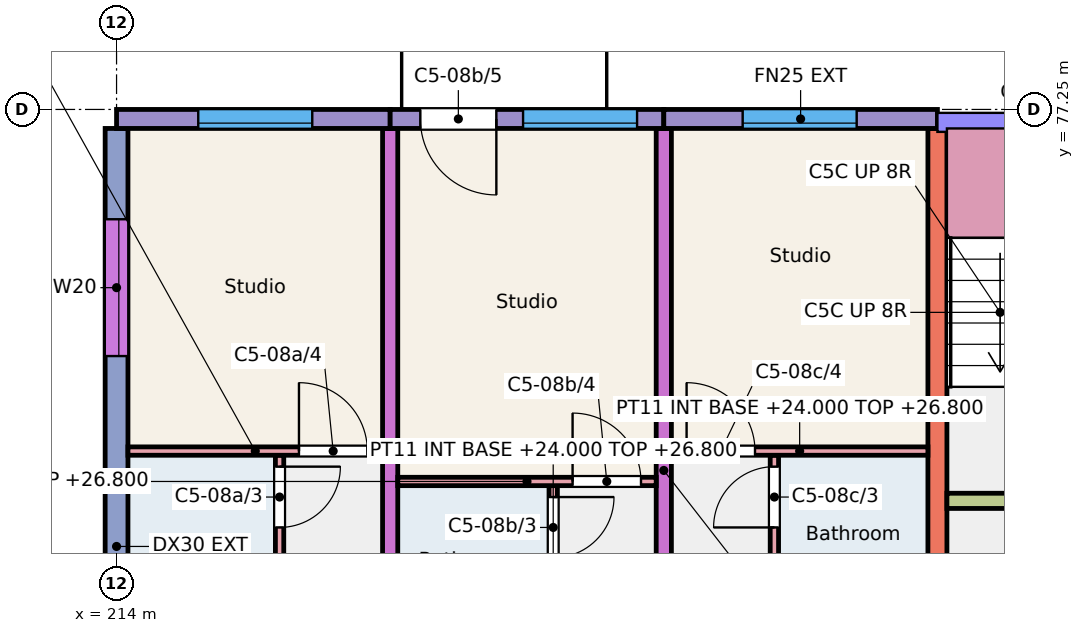
"""IFC4 building model, lengths in metres.
Left out: names, types, materials, properties, quantities, classifications, styles, units other than length and angle.
Written with IfcOpenShell. Run it as: python <this file> out.ifc"""

import sys

from ifc_helpers import new_model, si_unit, direction, frame, frame_2d, origin, place, context, subcontext, project, spatial, rectangle, extrude, element, fill, save


model = new_model("IFC4")
c1 = context("Model", 3, precision=1e-05, world=origin(), true_north=direction((0.0, 1.0)))
c2 = subcontext(c1, "Body", "Model", "MODEL_VIEW")
j1 = project(units=[si_unit("LENGTHUNIT", "METRE"), si_unit("PLANEANGLEUNIT", "RADIAN")], contexts=[c1])
p1 = place(None, origin())
s1 = spatial("IfcSite", under=j1, at=p1, CompositionType="ELEMENT")
p2 = place(p1, origin())
s2 = spatial("IfcBuilding", under=s1, at=p2, CompositionType="ELEMENT")
p3 = place(p2, frame((0.0, 0.0, 24.0)))
s3 = spatial("IfcBuildingStorey", under=s2, at=p3, CompositionType="ELEMENT", Elevation=24.0)
p4 = place(p3, frame((214.0, 66.0, 0.0), z_axis=(0.0, 0.0, 1.0), x_axis=(0.0, 1.0, 0.0)))
e1 = element("IfcWall", 1, at=p4, inside=s3, PredefinedType="SHEAR", context=c2, shape_type="SweptSolid", body=[
    extrude(rectangle(XDim=11.0, YDim=0.3, at=frame_2d((5.5, 0.0))), origin(), (0.0, 0.0, 1.0), 3.0),
])
p5 = place(p4, frame((2.6, 0.0, 0.9)))
e2 = element("IfcOpeningElement", 2, at=p5, cuts=e1, PredefinedType="OPENING", context=c2, shape_type="SweptSolid", body=[
    extrude(rectangle(XDim=1.2, YDim=1.5, at=frame_2d((0.6, 0.75))), frame((0.0, 0.16, 0.0), z_axis=(0.0, -1.0, 0.0), x_axis=(1.0, 0.0, 0.0)), (0.0, 0.0, 1.0), 0.32),
])
p6 = place(p4, frame((8.005, 0.0, 0.9)))
e3 = element("IfcOpeningElement", 3, at=p6, cuts=e1, PredefinedType="OPENING", context=c2, shape_type="SweptSolid", body=[
    extrude(rectangle(XDim=1.8, YDim=1.5, at=frame_2d((0.9, 0.75))), frame((0.0, 0.16, 0.0), z_axis=(0.0, -1.0, 0.0), x_axis=(1.0, 0.0, 0.0)), (0.0, 0.0, 1.0), 0.32),
])
for number, where, z_axis, x_axis in (
    (4, (217.6, 68.0, 0.0), (0.0, 0.0, 1.0), (0.0, 1.0, 0.0)),
    (5, (221.2, 68.0, 0.0), (0.0, 0.0, 1.0), (0.0, 1.0, 0.0)),
):
    element("IfcWall", number, at=place(p3, frame(where, z_axis=z_axis, x_axis=x_axis)), inside=s3, PredefinedType="SHEAR", context=c2, shape_type="SweptSolid", body=[
        extrude(rectangle(XDim=9.0, YDim=0.2, at=frame_2d((4.5, 0.0))), origin(), (0.0, 0.0, 1.0), 3.0),
    ])
p7 = place(p3, frame((224.8, 68.0, 0.0), z_axis=(0.0, 0.0, 1.0), x_axis=(0.0, 1.0, 0.0)))
e6 = element("IfcWall", 6, at=p7, inside=s3, PredefinedType="SHEAR", context=c2, shape_type="SweptSolid", body=[
    extrude(rectangle(XDim=9.0, YDim=0.25, at=frame_2d((4.5, 0.0))), origin(), (0.0, 0.0, 1.0), 3.0),
])
p8 = place(p3, frame((214.0, 77.125, 0.0), z_axis=(0.0, 0.0, 1.0), x_axis=(1.0, 0.0, 0.0)))
e7 = element("IfcWall", 7, at=p8, inside=s3, PredefinedType="SOLIDWALL", context=c2, shape_type="SweptSolid", body=[
    extrude(rectangle(XDim=3.6, YDim=0.25, at=frame_2d((1.8, 0.0))), origin(), (0.0, 0.0, 1.0), 3.0),
])
p9 = place(p8, frame((1.075, 0.0, 0.9)))
e8 = element("IfcOpeningElement", 8, at=p9, cuts=e7, PredefinedType="OPENING", context=c2, shape_type="SweptSolid", body=[
    extrude(rectangle(XDim=1.5, YDim=1.5, at=frame_2d((0.75, 0.75))), frame((0.0, 0.135, 0.0), z_axis=(0.0, -1.0, 0.0), x_axis=(1.0, 0.0, 0.0)), (0.0, 0.0, 1.0), 0.27),
])
p10 = place(p3, frame((217.6, 77.125, 0.0), z_axis=(0.0, 0.0, 1.0), x_axis=(1.0, 0.0, 0.0)))
e9 = element("IfcWall", 9, at=p10, inside=s3, PredefinedType="SOLIDWALL", context=c2, shape_type="SweptSolid", body=[
    extrude(rectangle(XDim=3.6, YDim=0.25, at=frame_2d((1.8, 0.0))), origin(), (0.0, 0.0, 1.0), 3.0),
])
p11 = place(p10, frame((1.749, 0.0, 0.9)))
e10 = element("IfcOpeningElement", 10, at=p11, cuts=e9, PredefinedType="OPENING", context=c2, shape_type="SweptSolid", body=[
    extrude(rectangle(XDim=1.5, YDim=1.5, at=frame_2d((0.75, 0.75))), frame((0.0, 0.135, 0.0), z_axis=(0.0, -1.0, 0.0), x_axis=(1.0, 0.0, 0.0)), (0.0, 0.0, 1.0), 0.27),
])
p12 = place(p10, frame((0.397, 0.0, 0.0)))
e11 = element("IfcOpeningElement", 11, at=p12, cuts=e9, PredefinedType="OPENING", context=c2, shape_type="SweptSolid", body=[
    extrude(rectangle(XDim=1.0, YDim=2.1, at=frame_2d((0.5, 1.05))), frame((0.0, 0.135, 0.0), z_axis=(0.0, -1.0, 0.0), x_axis=(1.0, 0.0, 0.0)), (0.0, 0.0, 1.0), 0.27),
])
p13 = place(p3, frame((221.2, 77.125, 0.0), z_axis=(0.0, 0.0, 1.0), x_axis=(1.0, 0.0, 0.0)))
e12 = element("IfcWall", 12, at=p13, inside=s3, PredefinedType="SOLIDWALL", context=c2, shape_type="SweptSolid", body=[
    extrude(rectangle(XDim=3.6, YDim=0.25, at=frame_2d((1.8, 0.0))), origin(), (0.0, 0.0, 1.0), 3.0),
])
p14 = place(p13, frame((1.038, 0.0, 0.9)))
e13 = element("IfcOpeningElement", 13, at=p14, cuts=e12, PredefinedType="OPENING", context=c2, shape_type="SweptSolid", body=[
    extrude(rectangle(XDim=1.5, YDim=1.5, at=frame_2d((0.75, 0.75))), frame((0.0, 0.135, 0.0), z_axis=(0.0, -1.0, 0.0), x_axis=(1.0, 0.0, 0.0)), (0.0, 0.0, 1.0), 0.27),
])
p15 = place(p3, frame((224.925, 72.1, 0.0), z_axis=(0.0, 0.0, 1.0), x_axis=(1.0, 0.0, 0.0)))
e14 = element("IfcWall", 14, at=p15, inside=s3, PredefinedType="SHEAR", context=c2, shape_type="SweptSolid", body=[
    extrude(rectangle(XDim=5.725, YDim=0.2, at=frame_2d((2.862, 0.0))), origin(), (0.0, 0.0, 1.0), 3.0),
])
p16 = place(p15, frame((0.95, 0.0, 0.0)))
e15 = element("IfcOpeningElement", 15, at=p16, cuts=e14, PredefinedType="OPENING", context=c2, shape_type="SweptSolid", body=[
    extrude(rectangle(XDim=1.0, YDim=2.1, at=frame_2d((0.5, 1.05))), frame((0.0, 0.11, 0.0), z_axis=(0.0, -1.0, 0.0), x_axis=(1.0, 0.0, 0.0)), (0.0, 0.0, 1.0), 0.22),
])
p17 = place(p15, frame((3.863, 0.0, 0.0)))
e16 = element("IfcOpeningElement", 16, at=p17, cuts=e14, PredefinedType="OPENING", context=c2, shape_type="SweptSolid", body=[
    extrude(rectangle(XDim=1.1, YDim=2.1, at=frame_2d((0.55, 1.05))), frame((0.0, 0.11, 0.0), z_axis=(0.0, -1.0, 0.0), x_axis=(1.0, 0.0, 0.0)), (0.0, 0.0, 1.0), 0.22),
])
p18 = place(p3, frame((216.145, 68.0, 0.0), z_axis=(0.0, 0.0, 1.0), x_axis=(0.0, 1.0, 0.0)))
e17 = element("IfcWall", 17, at=p18, inside=s3, PredefinedType="PARTITIONING", context=c2, shape_type="SweptSolid", body=[
    extrude(rectangle(XDim=4.7, YDim=0.11, at=frame_2d((2.35, 0.0))), origin(), (0.0, 0.0, 1.0), 2.8),
])
p19 = place(p18, frame((0.2, 0.0, 0.0)))
e18 = element("IfcOpeningElement", 18, at=p19, cuts=e17, PredefinedType="OPENING", context=c2, shape_type="SweptSolid", body=[
    extrude(rectangle(XDim=0.8, YDim=2.1, at=frame_2d((0.4, 1.05))), frame((0.0, 0.065, 0.0), z_axis=(0.0, -1.0, 0.0), x_axis=(1.0, 0.0, 0.0)), (0.0, 0.0, 1.0), 0.13),
])
p20 = place(p18, frame((3.75, 0.0, 0.0)))
e19 = element("IfcOpeningElement", 19, at=p20, cuts=e17, PredefinedType="OPENING", context=c2, shape_type="SweptSolid", body=[
    extrude(rectangle(XDim=0.8, YDim=2.1, at=frame_2d((0.4, 1.05))), frame((0.0, 0.065, 0.0), z_axis=(0.0, -1.0, 0.0), x_axis=(1.0, 0.0, 0.0)), (0.0, 0.0, 1.0), 0.13),
])
p21 = place(p3, frame((214.15, 72.755, 0.0), z_axis=(0.0, 0.0, 1.0), x_axis=(1.0, 0.0, 0.0)))
e20 = element("IfcWall", 20, at=p21, inside=s3, PredefinedType="PARTITIONING", context=c2, shape_type="SweptSolid", body=[
    extrude(rectangle(XDim=3.35, YDim=0.11, at=frame_2d((1.675, 0.0))), origin(), (0.0, 0.0, 1.0), 2.8),
])
p22 = place(p21, frame((2.25, 0.0, 0.0)))
e21 = element("IfcOpeningElement", 21, at=p22, cuts=e20, PredefinedType="OPENING", context=c2, shape_type="SweptSolid", body=[
    extrude(rectangle(XDim=0.9, YDim=2.1, at=frame_2d((0.45, 1.05))), frame((0.0, 0.065, 0.0), z_axis=(0.0, -1.0, 0.0), x_axis=(1.0, 0.0, 0.0)), (0.0, 0.0, 1.0), 0.13),
])
p23 = place(p3, frame((219.745, 68.0, 0.0), z_axis=(0.0, 0.0, 1.0), x_axis=(0.0, 1.0, 0.0)))
e22 = element("IfcWall", 22, at=p23, inside=s3, PredefinedType="PARTITIONING", context=c2, shape_type="SweptSolid", body=[
    extrude(rectangle(XDim=4.3, YDim=0.11, at=frame_2d((2.15, 0.0))), origin(), (0.0, 0.0, 1.0), 2.8),
])
p24 = place(p23, frame((0.2, 0.0, 0.0)))
e23 = element("IfcOpeningElement", 23, at=p24, cuts=e22, PredefinedType="OPENING", context=c2, shape_type="SweptSolid", body=[
    extrude(rectangle(XDim=0.8, YDim=2.1, at=frame_2d((0.4, 1.05))), frame((0.0, 0.065, 0.0), z_axis=(0.0, -1.0, 0.0), x_axis=(1.0, 0.0, 0.0)), (0.0, 0.0, 1.0), 0.13),
])
p25 = place(p23, frame((3.35, 0.0, 0.0)))
e24 = element("IfcOpeningElement", 24, at=p25, cuts=e22, PredefinedType="OPENING", context=c2, shape_type="SweptSolid", body=[
    extrude(rectangle(XDim=0.8, YDim=2.1, at=frame_2d((0.4, 1.05))), frame((0.0, 0.065, 0.0), z_axis=(0.0, -1.0, 0.0), x_axis=(1.0, 0.0, 0.0)), (0.0, 0.0, 1.0), 0.13),
])
p26 = place(p3, frame((217.7, 72.355, 0.0), z_axis=(0.0, 0.0, 1.0), x_axis=(1.0, 0.0, 0.0)))
e25 = element("IfcWall", 25, at=p26, inside=s3, PredefinedType="PARTITIONING", context=c2, shape_type="SweptSolid", body=[
    extrude(rectangle(XDim=3.4, YDim=0.11, at=frame_2d((1.7, 0.0))), origin(), (0.0, 0.0, 1.0), 2.8),
])
p27 = place(p26, frame((2.3, 0.0, 0.0)))
e26 = element("IfcOpeningElement", 26, at=p27, cuts=e25, PredefinedType="OPENING", context=c2, shape_type="SweptSolid", body=[
    extrude(rectangle(XDim=0.9, YDim=2.1, at=frame_2d((0.45, 1.05))), frame((0.0, 0.065, 0.0), z_axis=(0.0, -1.0, 0.0), x_axis=(1.0, 0.0, 0.0)), (0.0, 0.0, 1.0), 0.13),
])
p28 = place(p3, frame((222.655, 68.0, 0.0), z_axis=(0.0, 0.0, 1.0), x_axis=(0.0, 1.0, 0.0)))
e27 = element("IfcWall", 27, at=p28, inside=s3, PredefinedType="PARTITIONING", context=c2, shape_type="SweptSolid", body=[
    extrude(rectangle(XDim=4.7, YDim=0.11, at=frame_2d((2.35, 0.0))), origin(), (0.0, 0.0, 1.0), 2.8),
])
p29 = place(p28, frame((0.2, 0.0, 0.0)))
e28 = element("IfcOpeningElement", 28, at=p29, cuts=e27, PredefinedType="OPENING", context=c2, shape_type="SweptSolid", body=[
    extrude(rectangle(XDim=0.8, YDim=2.1, at=frame_2d((0.4, 1.05))), frame((0.0, 0.065, 0.0), z_axis=(0.0, -1.0, 0.0), x_axis=(1.0, 0.0, 0.0)), (0.0, 0.0, 1.0), 0.13),
])
p30 = place(p28, frame((3.75, 0.0, 0.0)))
e29 = element("IfcOpeningElement", 29, at=p30, cuts=e27, PredefinedType="OPENING", context=c2, shape_type="SweptSolid", body=[
    extrude(rectangle(XDim=0.8, YDim=2.1, at=frame_2d((0.4, 1.05))), frame((0.0, 0.065, 0.0), z_axis=(0.0, -1.0, 0.0), x_axis=(1.0, 0.0, 0.0)), (0.0, 0.0, 1.0), 0.13),
])
p31 = place(p3, frame((221.3, 72.755, 0.0), z_axis=(0.0, 0.0, 1.0), x_axis=(1.0, 0.0, 0.0)))
e30 = element("IfcWall", 30, at=p31, inside=s3, PredefinedType="PARTITIONING", context=c2, shape_type="SweptSolid", body=[
    extrude(rectangle(XDim=3.375, YDim=0.11, at=frame_2d((1.688, 0.0))), origin(), (0.0, 0.0, 1.0), 2.8),
])
p32 = place(p31, frame((0.2, 0.0, 0.0)))
e31 = element("IfcOpeningElement", 31, at=p32, cuts=e30, PredefinedType="OPENING", context=c2, shape_type="SweptSolid", body=[
    extrude(rectangle(XDim=0.9, YDim=2.1, at=frame_2d((0.45, 1.05))), frame((0.0, 0.065, 0.0), z_axis=(0.0, -1.0, 0.0), x_axis=(1.0, 0.0, 0.0)), (0.0, 0.0, 1.0), 0.13),
])
p33 = place(p9, origin())
e32 = element("IfcWindow", 32, at=p33, inside=s3, PartitioningType="SINGLE_PANEL", PredefinedType="WINDOW", context=c2, shape_type="SweptSolid", body=[
    extrude(rectangle(XDim=1.5, YDim=1.5, at=frame_2d((0.75, 0.75))), frame((0.0, -0.025, 0.0), z_axis=(0.0, -1.0, 0.0), x_axis=(1.0, 0.0, 0.0)), (0.0, 0.0, 1.0), 0.06),
])
fill(e8, e32)
p34 = place(p6, origin())
e33 = element("IfcWindow", 33, at=p34, inside=s3, PartitioningType="SINGLE_PANEL", PredefinedType="WINDOW", context=c2, shape_type="SweptSolid", body=[
    extrude(rectangle(XDim=1.8, YDim=1.5, at=frame_2d((0.9, 0.75))), frame((0.0, 0.0, 0.0), z_axis=(0.0, -1.0, 0.0), x_axis=(1.0, 0.0, 0.0)), (0.0, 0.0, 1.0), 0.06),
])
fill(e3, e33)
p35 = place(p11, origin())
e34 = element("IfcWindow", 34, at=p35, inside=s3, PartitioningType="SINGLE_PANEL", PredefinedType="WINDOW", context=c2, shape_type="SweptSolid", body=[
    extrude(rectangle(XDim=1.5, YDim=1.5, at=frame_2d((0.75, 0.75))), frame((0.0, -0.025, 0.0), z_axis=(0.0, -1.0, 0.0), x_axis=(1.0, 0.0, 0.0)), (0.0, 0.0, 1.0), 0.06),
])
fill(e10, e34)
p36 = place(p14, origin())
e35 = element("IfcWindow", 35, at=p36, inside=s3, PartitioningType="SINGLE_PANEL", PredefinedType="WINDOW", context=c2, shape_type="SweptSolid", body=[
    extrude(rectangle(XDim=1.5, YDim=1.5, at=frame_2d((0.75, 0.75))), frame((0.0, -0.025, 0.0), z_axis=(0.0, -1.0, 0.0), x_axis=(1.0, 0.0, 0.0)), (0.0, 0.0, 1.0), 0.06),
])
fill(e13, e35)
p37 = place(p20, origin())
e36 = element("IfcDoor", 36, at=p37, inside=s3, OperationType="SINGLE_SWING_RIGHT", PredefinedType="DOOR", context=c2, shape_type="SweptSolid", body=[
    extrude(rectangle(XDim=0.8, YDim=2.1, at=frame_2d((0.4, 1.05))), frame((0.0, 0.025, 0.0), z_axis=(0.0, -1.0, 0.0), x_axis=(1.0, 0.0, 0.0)), (0.0, 0.0, 1.0), 0.05),
])
fill(e19, e36)
p38 = place(p22, origin())
e37 = element("IfcDoor", 37, at=p38, inside=s3, OperationType="SINGLE_SWING_LEFT", PredefinedType="DOOR", context=c2, shape_type="SweptSolid", body=[
    extrude(rectangle(XDim=0.9, YDim=2.1, at=frame_2d((0.45, 1.05))), frame((0.0, 0.025, 0.0), z_axis=(0.0, -1.0, 0.0), x_axis=(1.0, 0.0, 0.0)), (0.0, 0.0, 1.0), 0.05),
])
fill(e21, e37)
p39 = place(p25, origin())
e38 = element("IfcDoor", 38, at=p39, inside=s3, OperationType="SINGLE_SWING_RIGHT", PredefinedType="DOOR", context=c2, shape_type="SweptSolid", body=[
    extrude(rectangle(XDim=0.8, YDim=2.1, at=frame_2d((0.4, 1.05))), frame((0.0, 0.025, 0.0), z_axis=(0.0, -1.0, 0.0), x_axis=(1.0, 0.0, 0.0)), (0.0, 0.0, 1.0), 0.05),
])
fill(e24, e38)
p40 = place(p27, origin())
e39 = element("IfcDoor", 39, at=p40, inside=s3, OperationType="SINGLE_SWING_LEFT", PredefinedType="DOOR", context=c2, shape_type="SweptSolid", body=[
    extrude(rectangle(XDim=0.9, YDim=2.1, at=frame_2d((0.45, 1.05))), frame((0.0, 0.025, 0.0), z_axis=(0.0, -1.0, 0.0), x_axis=(1.0, 0.0, 0.0)), (0.0, 0.0, 1.0), 0.05),
])
fill(e26, e39)
p41 = place(p12, origin())
e40 = element("IfcDoor", 40, at=p41, inside=s3, OperationType="SINGLE_SWING_RIGHT", PredefinedType="DOOR", context=c2, shape_type="SweptSolid", body=[
    extrude(rectangle(XDim=1.0, YDim=2.1, at=frame_2d((0.5, 1.05))), frame((0.0, 0.025, 0.0), z_axis=(0.0, -1.0, 0.0), x_axis=(1.0, 0.0, 0.0)), (0.0, 0.0, 1.0), 0.05),
])
fill(e11, e40)
p42 = place(p30, origin())
e41 = element("IfcDoor", 41, at=p42, inside=s3, OperationType="SINGLE_SWING_LEFT", PredefinedType="DOOR", context=c2, shape_type="SweptSolid", body=[
    extrude(rectangle(XDim=0.8, YDim=2.1, at=frame_2d((0.4, 1.05))), frame((0.0, 0.025, 0.0), z_axis=(0.0, -1.0, 0.0), x_axis=(1.0, 0.0, 0.0)), (0.0, 0.0, 1.0), 0.05),
])
fill(e29, e41)
p43 = place(p32, origin())
e42 = element("IfcDoor", 42, at=p43, inside=s3, OperationType="SINGLE_SWING_LEFT", PredefinedType="DOOR", context=c2, shape_type="SweptSolid", body=[
    extrude(rectangle(XDim=0.9, YDim=2.1, at=frame_2d((0.45, 1.05))), frame((0.0, 0.025, 0.0), z_axis=(0.0, -1.0, 0.0), x_axis=(1.0, 0.0, 0.0)), (0.0, 0.0, 1.0), 0.05),
])
fill(e31, e42)
save(model, sys.argv[1])
